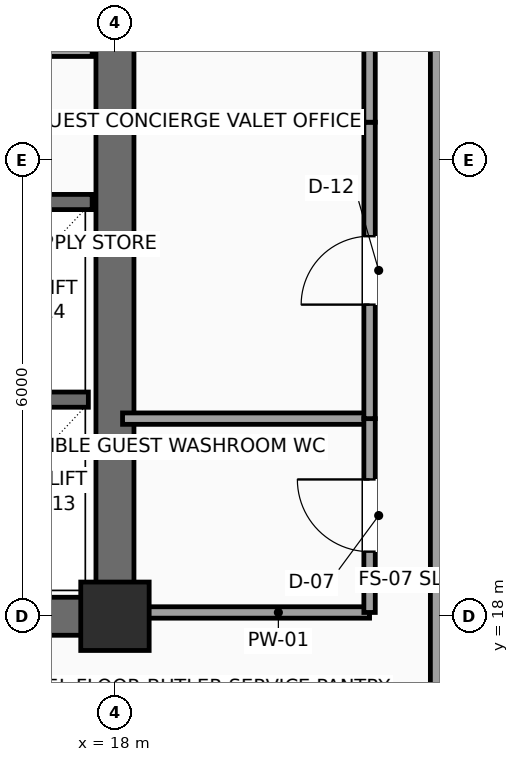
"""IFC4 building model, lengths in metres.
Left out: names, types, materials, properties, quantities, classifications, styles, units other than length and angle.
Written with IfcOpenShell. Run it as: python <this file> out.ifc"""

import sys

from ifc_helpers import new_model, si_unit, direction, frame, frame_2d, origin, origin_2d, place, context, subcontext, project, spatial, rectangle, extrude, element, fill, save


model = new_model("IFC4")
c1 = context("Model", 3, precision=1e-05, world=origin(), true_north=direction((0.0, 1.0)))
c2 = subcontext(c1, "Body", "Model", "MODEL_VIEW")
j1 = project(units=[si_unit("LENGTHUNIT", "METRE"), si_unit("PLANEANGLEUNIT", "RADIAN")], contexts=[c1])
p1 = place(None, origin())
s1 = spatial("IfcSite", under=j1, at=p1, CompositionType="ELEMENT")
p2 = place(p1, origin())
s2 = spatial("IfcBuilding", under=s1, at=p2, CompositionType="ELEMENT")
p3 = place(p2, frame((0.0, 0.0, 172.95)))
s3 = spatial("IfcBuildingStorey", under=s2, at=p3, CompositionType="ELEMENT", Elevation=172.95)
p4 = place(p3, frame((18.0, 18.0, 0.0), z_axis=(0.0, 0.0, 1.0), x_axis=(1.0, 0.0, 0.0)))
e1 = element("IfcColumn", 1, at=p4, inside=s3, PredefinedType="COLUMN", context=c2, shape_type="SweptSolid", body=[
    extrude(rectangle(XDim=0.9, YDim=0.9, at=origin_2d()), origin(), (0.0, 0.0, 1.0), 3.75),
])
p5 = place(p3, frame((6.0, 18.0, 0.0), z_axis=(0.0, 0.0, 1.0), x_axis=(1.0, 0.0, 0.0)))
e2 = element("IfcWall", 2, at=p5, inside=s3, PredefinedType="SHEAR", context=c2, shape_type="SweptSolid", body=[
    extrude(rectangle(XDim=12.0, YDim=0.5, at=frame_2d((6.0, 0.0))), origin(), (0.0, 0.0, 1.0), 3.54),
])
p6 = place(p5, frame((7.15, 0.0, 0.0)))
e3 = element("IfcOpeningElement", 3, at=p6, cuts=e2, PredefinedType="OPENING", context=c2, shape_type="SweptSolid", body=[
    extrude(rectangle(XDim=1.6, YDim=2.3, at=frame_2d((0.8, 1.15))), frame((0.0, 0.26, 0.0), z_axis=(0.0, -1.0, 0.0), x_axis=(1.0, 0.0, 0.0)), (0.0, 0.0, 1.0), 0.52),
])
p7 = place(p3, frame((18.0, 18.0, 0.0), z_axis=(0.0, 0.0, 1.0), x_axis=(0.0, 1.0, 0.0)))
e4 = element("IfcWall", 4, at=p7, inside=s3, PredefinedType="SHEAR", context=c2, shape_type="SweptSolid", body=[
    extrude(rectangle(XDim=9.6, YDim=0.5, at=frame_2d((4.8, 0.0))), origin(), (0.0, 0.0, 1.0), 3.54),
])
p8 = place(p3, frame((15.25, 20.85, 0.0), z_axis=(0.0, 0.0, 1.0), x_axis=(1.0, 0.0, 0.0)))
e5 = element("IfcWall", 5, at=p8, inside=s3, PredefinedType="SHEAR", context=c2, shape_type="SweptSolid", body=[
    extrude(rectangle(XDim=2.4, YDim=0.2, at=frame_2d((1.2, 0.0))), origin(), (0.0, 0.0, 1.0), 3.54),
])
p9 = place(p3, frame((15.25, 23.45, 0.0), z_axis=(0.0, 0.0, 1.0), x_axis=(1.0, 0.0, 0.0)))
e6 = element("IfcWall", 6, at=p9, inside=s3, PredefinedType="SHEAR", context=c2, shape_type="SweptSolid", body=[
    extrude(rectangle(XDim=2.45, YDim=0.2, at=frame_2d((1.225, 0.0))), origin(), (0.0, 0.0, 1.0), 3.54),
])
p10 = place(p3, frame((15.28, 25.44, 0.0), z_axis=(0.0, 0.0, 1.0), x_axis=(1.0, 0.0, 0.0)))
e7 = element("IfcWall", 7, at=p10, inside=s3, PredefinedType="PARTITIONING", context=c2, shape_type="SweptSolid", body=[
    extrude(rectangle(XDim=2.42, YDim=0.15, at=frame_2d((1.21, 0.0))), origin(), (0.0, 0.0, 1.0), 3.54),
])
p11 = place(p10, frame((0.65, 0.0, 0.0)))
e8 = element("IfcOpeningElement", 8, at=p11, cuts=e7, PredefinedType="OPENING", context=c2, shape_type="SweptSolid", body=[
    extrude(rectangle(XDim=0.9, YDim=2.15, at=frame_2d((0.45, 1.075))), frame((0.0, 0.085, 0.0), z_axis=(0.0, -1.0, 0.0), x_axis=(1.0, 0.0, 0.0)), (0.0, 0.0, 1.0), 0.17),
])
p12 = place(p3, frame((22.25, 11.05, 0.0), z_axis=(0.0, 0.0, 1.0), x_axis=(0.0, 1.0, 0.0)))
e9 = element("IfcWall", 9, at=p12, inside=s3, PredefinedType="PARTITIONING", context=c2, shape_type="SweptSolid", body=[
    extrude(rectangle(XDim=19.2, YDim=0.2, at=frame_2d((9.6, 0.0))), origin(), (0.0, 0.0, 1.0), 3.54),
])
p13 = place(p3, frame((18.1, 18.05, 0.0), z_axis=(0.0, 0.0, 1.0), x_axis=(1.0, 0.0, 0.0)))
e10 = element("IfcWall", 10, at=p13, inside=s3, PredefinedType="PARTITIONING", context=c2, shape_type="SweptSolid", body=[
    extrude(rectangle(XDim=3.25, YDim=0.15, at=frame_2d((1.625, 0.0))), origin(), (0.0, 0.0, 1.0), 3.132),
])
p14 = place(p3, frame((18.1, 20.6, 0.0), z_axis=(0.0, 0.0, 1.0), x_axis=(1.0, 0.0, 0.0)))
e11 = element("IfcWall", 11, at=p14, inside=s3, PredefinedType="PARTITIONING", context=c2, shape_type="SweptSolid", body=[
    extrude(rectangle(XDim=3.25, YDim=0.15, at=frame_2d((1.625, 0.0))), origin(), (0.0, 0.0, 1.0), 3.54),
])
p15 = place(p3, frame((21.35, 18.05, 0.0), z_axis=(0.0, 0.0, 1.0), x_axis=(0.0, 1.0, 0.0)))
e12 = element("IfcWall", 12, at=p15, inside=s3, PredefinedType="PARTITIONING", context=c2, shape_type="SweptSolid", body=[
    extrude(rectangle(XDim=2.55, YDim=0.15, at=frame_2d((1.275, 0.0))), origin(), (0.0, 0.0, 1.0), 3.54),
])
p16 = place(p15, frame((0.8, 0.0, 0.0)))
e13 = element("IfcOpeningElement", 13, at=p16, cuts=e12, PredefinedType="OPENING", context=c2, shape_type="SweptSolid", body=[
    extrude(rectangle(XDim=0.95, YDim=2.15, at=frame_2d((0.475, 1.075))), frame((0.0, 0.085, 0.0), z_axis=(0.0, -1.0, 0.0), x_axis=(1.0, 0.0, 0.0)), (0.0, 0.0, 1.0), 0.17),
])
p17 = place(p3, frame((18.1, 24.5, 0.0), z_axis=(0.0, 0.0, 1.0), x_axis=(1.0, 0.0, 0.0)))
e14 = element("IfcWall", 14, at=p17, inside=s3, PredefinedType="PARTITIONING", context=c2, shape_type="SweptSolid", body=[
    extrude(rectangle(XDim=3.25, YDim=0.15, at=frame_2d((1.625, 0.0))), origin(), (0.0, 0.0, 1.0), 3.54),
])
p18 = place(p3, frame((21.35, 20.6, 0.0), z_axis=(0.0, 0.0, 1.0), x_axis=(0.0, 1.0, 0.0)))
e15 = element("IfcWall", 15, at=p18, inside=s3, PredefinedType="PARTITIONING", context=c2, shape_type="SweptSolid", body=[
    extrude(rectangle(XDim=3.9, YDim=0.15, at=frame_2d((1.95, 0.0))), origin(), (0.0, 0.0, 1.0), 3.54),
])
p19 = place(p18, frame((1.5, 0.0, 0.0)))
e16 = element("IfcOpeningElement", 16, at=p19, cuts=e15, PredefinedType="OPENING", context=c2, shape_type="SweptSolid", body=[
    extrude(rectangle(XDim=0.9, YDim=2.1, at=frame_2d((0.45, 1.05))), frame((0.0, 0.085, 0.0), z_axis=(0.0, -1.0, 0.0), x_axis=(1.0, 0.0, 0.0)), (0.0, 0.0, 1.0), 0.17),
])
p20 = place(p3, frame((21.35, 24.5, 0.0), z_axis=(0.0, 0.0, 1.0), x_axis=(0.0, 1.0, 0.0)))
e17 = element("IfcWall", 17, at=p20, inside=s3, PredefinedType="PARTITIONING", context=c2, shape_type="SweptSolid", body=[
    extrude(rectangle(XDim=3.05, YDim=0.15, at=frame_2d((1.525, 0.0))), origin(), (0.0, 0.0, 1.0), 3.54),
])
p21 = place(p20, frame((1.05, 0.0, 0.0)))
e18 = element("IfcOpeningElement", 18, at=p21, cuts=e17, PredefinedType="OPENING", context=c2, shape_type="SweptSolid", body=[
    extrude(rectangle(XDim=0.95, YDim=2.15, at=frame_2d((0.475, 1.075))), frame((0.0, 0.085, 0.0), z_axis=(0.0, -1.0, 0.0), x_axis=(1.0, 0.0, 0.0)), (0.0, 0.0, 1.0), 0.17),
])
p22 = place(p16, origin())
e19 = element("IfcDoor", 19, at=p22, inside=s3, OperationType="SINGLE_SWING_RIGHT", PredefinedType="DOOR", context=c2, shape_type="SweptSolid", body=[
    extrude(rectangle(XDim=0.95, YDim=2.15, at=frame_2d((0.475, 1.075))), frame((0.0, 0.025, 0.0), z_axis=(0.0, -1.0, 0.0), x_axis=(1.0, 0.0, 0.0)), (0.0, 0.0, 1.0), 0.05),
])
fill(e13, e19)
p23 = place(p19, origin())
e20 = element("IfcDoor", 20, at=p23, inside=s3, OperationType="SINGLE_SWING_LEFT", PredefinedType="DOOR", context=c2, shape_type="SweptSolid", body=[
    extrude(rectangle(XDim=0.9, YDim=2.1, at=frame_2d((0.45, 1.05))), frame((0.0, 0.025, 0.0), z_axis=(0.0, -1.0, 0.0), x_axis=(1.0, 0.0, 0.0)), (0.0, 0.0, 1.0), 0.05),
])
fill(e16, e20)
save(model, sys.argv[1])
